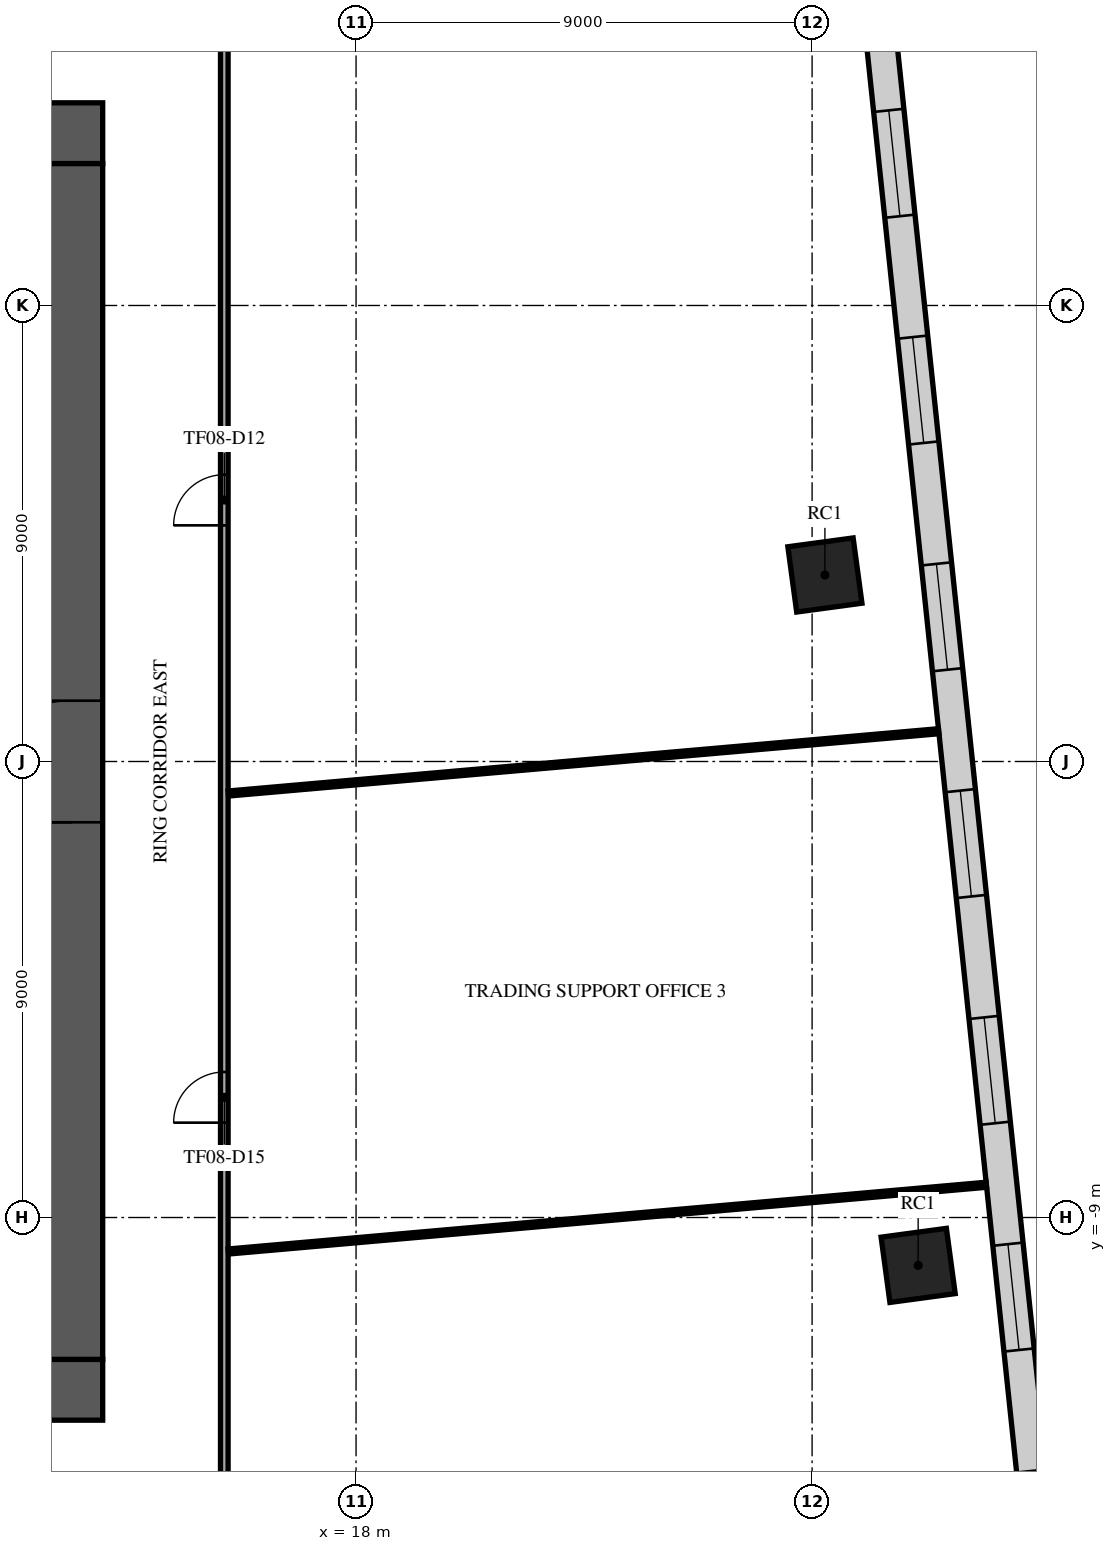
"""IFC4 building model, lengths in metres.
Left out: names, types, materials, properties, quantities, classifications, styles, units other than length and angle.
Written with IfcOpenShell. Run it as: python <this file> out.ifc"""

import sys

from ifc_helpers import new_model, si_unit, direction, frame, frame_2d, origin, origin_2d, place, context, subcontext, project, spatial, rectangle, extrude, element, fill, save


model = new_model("IFC4")
c1 = context("Model", 3, precision=1e-05, world=origin(), true_north=direction((0.0, 1.0)))
c2 = subcontext(c1, "Body", "Model", "MODEL_VIEW")
j1 = project(units=[si_unit("LENGTHUNIT", "METRE"), si_unit("PLANEANGLEUNIT", "RADIAN")], contexts=[c1])
p1 = place(None, origin())
s1 = spatial("IfcSite", under=j1, at=p1, CompositionType="ELEMENT")
p2 = place(p1, origin())
s2 = spatial("IfcBuilding", under=s1, at=p2, CompositionType="ELEMENT")
p3 = place(p2, frame((0.0, 0.0, 36.9)))
s3 = spatial("IfcBuildingStorey", under=s2, at=p3, CompositionType="ELEMENT", Elevation=36.9)
for number, where, z_axis, x_axis in (
    (1, (29.093, -9.945, 0.0), (0.0, 0.0, 1.0), (0.991, 0.134, 0.0)),
    (2, (27.253, 3.681, 0.0), (0.0, 0.0, 1.0), (0.991, 0.134, 0.0)),
):
    element("IfcColumn", number, at=place(p3, frame(where, z_axis=z_axis, x_axis=x_axis)), inside=s3, PredefinedType="COLUMN", context=c2, shape_type="SweptSolid", body=[
        extrude(rectangle(XDim=1.3, YDim=1.3, at=origin_2d()), origin(), (0.0, 0.0, 1.0), 4.8),
    ])
p4 = place(p3, frame((-13.0, 12.4, 0.0), z_axis=(0.0, 0.0, 1.0), x_axis=(1.0, 0.0, 0.0)))
e3 = element("IfcWall", 3, at=p4, inside=s3, PredefinedType="SHEAR", context=c2, shape_type="SweptSolid", body=[
    extrude(rectangle(XDim=26.0, YDim=1.2, at=frame_2d((13.0, 0.0))), origin(), (0.0, 0.0, 1.0), 4.35),
])
p5 = place(p4, frame((11.8, 0.0, 0.0)))
e4 = element("IfcOpeningElement", 4, at=p5, cuts=e3, PredefinedType="OPENING", context=c2, shape_type="SweptSolid", body=[
    extrude(rectangle(XDim=2.4, YDim=2.4, at=frame_2d((1.2, 1.2))), frame((0.0, 0.61, 0.0), z_axis=(0.0, -1.0, 0.0), x_axis=(1.0, 0.0, 0.0)), (0.0, 0.0, 1.0), 1.22),
])
p6 = place(p4, frame((22.625, 0.0, 0.0)))
e5 = element("IfcOpeningElement", 5, at=p6, cuts=e3, PredefinedType="OPENING", context=c2, shape_type="SweptSolid", body=[
    extrude(rectangle(XDim=1.2, YDim=2.1, at=frame_2d((0.6, 1.05))), frame((0.0, 0.61, 0.0), z_axis=(0.0, -1.0, 0.0), x_axis=(1.0, 0.0, 0.0)), (0.0, 0.0, 1.0), 1.22),
])
p7 = place(p4, frame((1.6, 0.0, 0.0)))
e6 = element("IfcOpeningElement", 6, at=p7, cuts=e3, PredefinedType="OPENING", context=c2, shape_type="SweptSolid", body=[
    extrude(rectangle(XDim=1.0, YDim=2.1, at=frame_2d((0.5, 1.05))), frame((0.0, 0.61, 0.0), z_axis=(0.0, -1.0, 0.0), x_axis=(1.0, 0.0, 0.0)), (0.0, 0.0, 1.0), 1.22),
])
p8 = place(p3, frame((-13.0, -12.4, 0.0), z_axis=(0.0, 0.0, 1.0), x_axis=(1.0, 0.0, 0.0)))
e7 = element("IfcWall", 7, at=p8, inside=s3, PredefinedType="SHEAR", context=c2, shape_type="SweptSolid", body=[
    extrude(rectangle(XDim=26.0, YDim=1.2, at=frame_2d((13.0, 0.0))), origin(), (0.0, 0.0, 1.0), 4.35),
])
p9 = place(p8, frame((7.9, 0.0, 0.0)))
e8 = element("IfcOpeningElement", 8, at=p9, cuts=e7, PredefinedType="OPENING", context=c2, shape_type="SweptSolid", body=[
    extrude(rectangle(XDim=2.0, YDim=2.1, at=frame_2d((1.0, 1.05))), frame((0.0, 0.61, 0.0), z_axis=(0.0, -1.0, 0.0), x_axis=(1.0, 0.0, 0.0)), (0.0, 0.0, 1.0), 1.22),
])
p10 = place(p8, frame((18.025, 0.0, 0.0)))
e9 = element("IfcOpeningElement", 9, at=p10, cuts=e7, PredefinedType="OPENING", context=c2, shape_type="SweptSolid", body=[
    extrude(rectangle(XDim=1.2, YDim=2.1, at=frame_2d((0.6, 1.05))), frame((0.0, 0.61, 0.0), z_axis=(0.0, -1.0, 0.0), x_axis=(1.0, 0.0, 0.0)), (0.0, 0.0, 1.0), 1.22),
])
p11 = place(p8, frame((2.175, 0.0, 0.0)))
e10 = element("IfcOpeningElement", 10, at=p11, cuts=e7, PredefinedType="OPENING", context=c2, shape_type="SweptSolid", body=[
    extrude(rectangle(XDim=1.2, YDim=2.1, at=frame_2d((0.6, 1.05))), frame((0.0, 0.61, 0.0), z_axis=(0.0, -1.0, 0.0), x_axis=(1.0, 0.0, 0.0)), (0.0, 0.0, 1.0), 1.22),
])
p12 = place(p8, frame((22.625, 0.0, 0.0)))
e11 = element("IfcOpeningElement", 11, at=p12, cuts=e7, PredefinedType="OPENING", context=c2, shape_type="SweptSolid", body=[
    extrude(rectangle(XDim=1.2, YDim=2.1, at=frame_2d((0.6, 1.05))), frame((0.0, 0.61, 0.0), z_axis=(0.0, -1.0, 0.0), x_axis=(1.0, 0.0, 0.0)), (0.0, 0.0, 1.0), 1.22),
])
p13 = place(p3, frame((12.4, -11.8, 0.0), z_axis=(0.0, 0.0, 1.0), x_axis=(0.0, 1.0, 0.0)))
e12 = element("IfcWall", 12, at=p13, inside=s3, PredefinedType="SHEAR", context=c2, shape_type="SweptSolid", body=[
    extrude(rectangle(XDim=23.6, YDim=1.2, at=frame_2d((11.8, 0.0))), origin(), (0.0, 0.0, 1.0), 4.35),
])
p14 = place(p13, frame((10.6, 0.0, 0.0)))
e13 = element("IfcOpeningElement", 13, at=p14, cuts=e12, PredefinedType="OPENING", context=c2, shape_type="SweptSolid", body=[
    extrude(rectangle(XDim=2.4, YDim=2.4, at=frame_2d((1.2, 1.2))), frame((0.0, 0.61, 0.0), z_axis=(0.0, -1.0, 0.0), x_axis=(1.0, 0.0, 0.0)), (0.0, 0.0, 1.0), 1.22),
])
p15 = place(p3, frame((32.137, -21.635, 0.0), z_axis=(0.0, 0.0, 1.0), x_axis=(-0.104527776833, 0.994521967515, 0.0)))
e14 = element("IfcWall", 14, at=p15, inside=s3, PredefinedType="STANDARD", context=c2, shape_type="SweptSolid", body=[
    extrude(rectangle(XDim=49.376, YDim=0.6, at=frame_2d((24.688, 0.0))), origin(), (0.0, 0.0, 1.0), 4.35),
])
p16 = place(p15, frame((1.138, 0.0, 0.9)))
e15 = element("IfcOpeningElement", 15, at=p16, cuts=e14, PredefinedType="OPENING", context=c2, shape_type="SweptSolid", body=[
    extrude(rectangle(XDim=2.1, YDim=2.7, at=frame_2d((1.05, 1.35))), frame((0.0, 0.31, 0.0), z_axis=(0.0, -1.0, 0.0), x_axis=(1.0, 0.0, 0.0)), (0.0, 0.0, 1.0), 0.62),
])
p17 = place(p15, frame((5.576, 0.0, 0.9)))
e16 = element("IfcOpeningElement", 16, at=p17, cuts=e14, PredefinedType="OPENING", context=c2, shape_type="SweptSolid", body=[
    extrude(rectangle(XDim=2.1, YDim=2.7, at=frame_2d((1.05, 1.35))), frame((0.0, 0.31, 0.0), z_axis=(0.0, -1.0, 0.0), x_axis=(1.0, 0.0, 0.0)), (0.0, 0.0, 1.0), 0.62),
])
p18 = place(p15, frame((10.076, 0.0, 0.9)))
e17 = element("IfcOpeningElement", 17, at=p18, cuts=e14, PredefinedType="OPENING", context=c2, shape_type="SweptSolid", body=[
    extrude(rectangle(XDim=2.1, YDim=2.7, at=frame_2d((1.05, 1.35))), frame((0.0, 0.31, 0.0), z_axis=(0.0, -1.0, 0.0), x_axis=(1.0, 0.0, 0.0)), (0.0, 0.0, 1.0), 0.62),
])
p19 = place(p15, frame((14.576, 0.0, 0.9)))
e18 = element("IfcOpeningElement", 18, at=p19, cuts=e14, PredefinedType="OPENING", context=c2, shape_type="SweptSolid", body=[
    extrude(rectangle(XDim=2.1, YDim=2.7, at=frame_2d((1.05, 1.35))), frame((0.0, 0.31, 0.0), z_axis=(0.0, -1.0, 0.0), x_axis=(1.0, 0.0, 0.0)), (0.0, 0.0, 1.0), 0.62),
])
p20 = place(p15, frame((19.076, 0.0, 0.9)))
e19 = element("IfcOpeningElement", 19, at=p20, cuts=e14, PredefinedType="OPENING", context=c2, shape_type="SweptSolid", body=[
    extrude(rectangle(XDim=2.1, YDim=2.7, at=frame_2d((1.05, 1.35))), frame((0.0, 0.31, 0.0), z_axis=(0.0, -1.0, 0.0), x_axis=(1.0, 0.0, 0.0)), (0.0, 0.0, 1.0), 0.62),
])
p21 = place(p15, frame((23.576, 0.0, 0.9)))
e20 = element("IfcOpeningElement", 20, at=p21, cuts=e14, PredefinedType="OPENING", context=c2, shape_type="SweptSolid", body=[
    extrude(rectangle(XDim=2.1, YDim=2.7, at=frame_2d((1.05, 1.35))), frame((0.0, 0.31, 0.0), z_axis=(0.0, -1.0, 0.0), x_axis=(1.0, 0.0, 0.0)), (0.0, 0.0, 1.0), 0.62),
])
p22 = place(p15, frame((28.076, 0.0, 0.9)))
e21 = element("IfcOpeningElement", 21, at=p22, cuts=e14, PredefinedType="OPENING", context=c2, shape_type="SweptSolid", body=[
    extrude(rectangle(XDim=2.1, YDim=2.7, at=frame_2d((1.05, 1.35))), frame((0.0, 0.31, 0.0), z_axis=(0.0, -1.0, 0.0), x_axis=(1.0, 0.0, 0.0)), (0.0, 0.0, 1.0), 0.62),
])
p23 = place(p15, frame((32.576, 0.0, 0.9)))
e22 = element("IfcOpeningElement", 22, at=p23, cuts=e14, PredefinedType="OPENING", context=c2, shape_type="SweptSolid", body=[
    extrude(rectangle(XDim=2.1, YDim=2.7, at=frame_2d((1.05, 1.35))), frame((0.0, 0.31, 0.0), z_axis=(0.0, -1.0, 0.0), x_axis=(1.0, 0.0, 0.0)), (0.0, 0.0, 1.0), 0.62),
])
p24 = place(p15, frame((37.076, 0.0, 0.9)))
e23 = element("IfcOpeningElement", 23, at=p24, cuts=e14, PredefinedType="OPENING", context=c2, shape_type="SweptSolid", body=[
    extrude(rectangle(XDim=2.1, YDim=2.7, at=frame_2d((1.05, 1.35))), frame((0.0, 0.31, 0.0), z_axis=(0.0, -1.0, 0.0), x_axis=(1.0, 0.0, 0.0)), (0.0, 0.0, 1.0), 0.62),
])
p25 = place(p15, frame((41.576, 0.0, 0.9)))
e24 = element("IfcOpeningElement", 24, at=p25, cuts=e14, PredefinedType="OPENING", context=c2, shape_type="SweptSolid", body=[
    extrude(rectangle(XDim=2.1, YDim=2.7, at=frame_2d((1.05, 1.35))), frame((0.0, 0.31, 0.0), z_axis=(0.0, -1.0, 0.0), x_axis=(1.0, 0.0, 0.0)), (0.0, 0.0, 1.0), 0.62),
])
p26 = place(p15, frame((46.076, 0.0, 0.9)))
e25 = element("IfcOpeningElement", 25, at=p26, cuts=e14, PredefinedType="OPENING", context=c2, shape_type="SweptSolid", body=[
    extrude(rectangle(XDim=2.1, YDim=2.7, at=frame_2d((1.05, 1.35))), frame((0.0, 0.31, 0.0), z_axis=(0.0, -1.0, 0.0), x_axis=(1.0, 0.0, 0.0)), (0.0, 0.0, 1.0), 0.62),
])
p27 = place(p3, frame((15.4, -15.325, 0.0), z_axis=(0.0, 0.0, 1.0), x_axis=(0.0, 1.0, 0.0)))
e26 = element("IfcWall", 26, at=p27, inside=s3, PredefinedType="PARTITIONING", context=c2, shape_type="SweptSolid", body=[
    extrude(rectangle(XDim=30.65, YDim=0.15, at=frame_2d((15.325, 0.0))), origin(), (0.0, 0.0, 1.0), 3.85),
])
p28 = place(p27, frame((19.986, 0.0, 0.0)))
e27 = element("IfcOpeningElement", 27, at=p28, cuts=e26, PredefinedType="OPENING", context=c2, shape_type="SweptSolid", body=[
    extrude(rectangle(XDim=1.0, YDim=2.1, at=frame_2d((0.5, 1.05))), frame((0.0, 0.085, 0.0), z_axis=(0.0, -1.0, 0.0), x_axis=(1.0, 0.0, 0.0)), (0.0, 0.0, 1.0), 0.17),
])
p29 = place(p27, frame((8.197, 0.0, 0.0)))
e28 = element("IfcOpeningElement", 28, at=p29, cuts=e26, PredefinedType="OPENING", context=c2, shape_type="SweptSolid", body=[
    extrude(rectangle(XDim=1.0, YDim=2.1, at=frame_2d((0.5, 1.05))), frame((0.0, 0.085, 0.0), z_axis=(0.0, -1.0, 0.0), x_axis=(1.0, 0.0, 0.0)), (0.0, 0.0, 1.0), 0.17),
])
p30 = place(p3, frame((15.479, -9.671, 0.0), z_axis=(0.0, 0.0, 1.0), x_axis=(0.996145743112, 0.08771350227, 0.0)))
e29 = element("IfcWall", 29, at=p30, inside=s3, PredefinedType="PARTITIONING", context=c2, shape_type="SweptSolid", body=[
    extrude(rectangle(XDim=15.016, YDim=0.1, at=frame_2d((7.508, 0.0))), origin(), (0.0, 0.0, 1.0), 3.55),
])
p31 = place(p3, frame((15.479, -0.632, 0.0), z_axis=(0.0, 0.0, 1.0), x_axis=(0.99617559828, 0.087373779768, 0.0)))
e30 = element("IfcWall", 30, at=p31, inside=s3, PredefinedType="PARTITIONING", context=c2, shape_type="SweptSolid", body=[
    extrude(rectangle(XDim=14.072, YDim=0.1, at=frame_2d((7.036, 0.0))), origin(), (0.0, 0.0, 1.0), 3.55),
])
p32 = place(p14, origin())
e31 = element("IfcDoor", 31, at=p32, inside=s3, OperationType="SINGLE_SWING_LEFT", PredefinedType="DOOR", context=c2, shape_type="SweptSolid", body=[
    extrude(rectangle(XDim=2.4, YDim=2.4, at=frame_2d((1.2, 1.2))), frame((0.0, 0.025, 0.0), z_axis=(0.0, -1.0, 0.0), x_axis=(1.0, 0.0, 0.0)), (0.0, 0.0, 1.0), 0.05),
])
fill(e13, e31)
p33 = place(p17, origin())
e32 = element("IfcWindow", 32, at=p33, inside=s3, PartitioningType="SINGLE_PANEL", PredefinedType="WINDOW", context=c2, shape_type="SweptSolid", body=[
    extrude(rectangle(XDim=2.1, YDim=2.7, at=frame_2d((1.05, 1.35))), frame((0.0, 0.03, 0.0), z_axis=(0.0, -1.0, 0.0), x_axis=(1.0, 0.0, 0.0)), (0.0, 0.0, 1.0), 0.06),
])
fill(e16, e32)
p34 = place(p18, origin())
e33 = element("IfcWindow", 33, at=p34, inside=s3, PartitioningType="SINGLE_PANEL", PredefinedType="WINDOW", context=c2, shape_type="SweptSolid", body=[
    extrude(rectangle(XDim=2.1, YDim=2.7, at=frame_2d((1.05, 1.35))), frame((0.0, 0.03, 0.0), z_axis=(0.0, -1.0, 0.0), x_axis=(1.0, 0.0, 0.0)), (0.0, 0.0, 1.0), 0.06),
])
fill(e17, e33)
p35 = place(p19, origin())
e34 = element("IfcWindow", 34, at=p35, inside=s3, PartitioningType="SINGLE_PANEL", PredefinedType="WINDOW", context=c2, shape_type="SweptSolid", body=[
    extrude(rectangle(XDim=2.1, YDim=2.7, at=frame_2d((1.05, 1.35))), frame((0.0, 0.03, 0.0), z_axis=(0.0, -1.0, 0.0), x_axis=(1.0, 0.0, 0.0)), (0.0, 0.0, 1.0), 0.06),
])
fill(e18, e34)
p36 = place(p20, origin())
e35 = element("IfcWindow", 35, at=p36, inside=s3, PartitioningType="SINGLE_PANEL", PredefinedType="WINDOW", context=c2, shape_type="SweptSolid", body=[
    extrude(rectangle(XDim=2.1, YDim=2.7, at=frame_2d((1.05, 1.35))), frame((0.0, 0.03, 0.0), z_axis=(0.0, -1.0, 0.0), x_axis=(1.0, 0.0, 0.0)), (0.0, 0.0, 1.0), 0.06),
])
fill(e19, e35)
p37 = place(p21, origin())
e36 = element("IfcWindow", 36, at=p37, inside=s3, PartitioningType="SINGLE_PANEL", PredefinedType="WINDOW", context=c2, shape_type="SweptSolid", body=[
    extrude(rectangle(XDim=2.1, YDim=2.7, at=frame_2d((1.05, 1.35))), frame((0.0, 0.03, 0.0), z_axis=(0.0, -1.0, 0.0), x_axis=(1.0, 0.0, 0.0)), (0.0, 0.0, 1.0), 0.06),
])
fill(e20, e36)
p38 = place(p22, origin())
e37 = element("IfcWindow", 37, at=p38, inside=s3, PartitioningType="SINGLE_PANEL", PredefinedType="WINDOW", context=c2, shape_type="SweptSolid", body=[
    extrude(rectangle(XDim=2.1, YDim=2.7, at=frame_2d((1.05, 1.35))), frame((0.0, 0.03, 0.0), z_axis=(0.0, -1.0, 0.0), x_axis=(1.0, 0.0, 0.0)), (0.0, 0.0, 1.0), 0.06),
])
fill(e21, e37)
p39 = place(p23, origin())
e38 = element("IfcWindow", 38, at=p39, inside=s3, PartitioningType="SINGLE_PANEL", PredefinedType="WINDOW", context=c2, shape_type="SweptSolid", body=[
    extrude(rectangle(XDim=2.1, YDim=2.7, at=frame_2d((1.05, 1.35))), frame((0.0, 0.03, 0.0), z_axis=(0.0, -1.0, 0.0), x_axis=(1.0, 0.0, 0.0)), (0.0, 0.0, 1.0), 0.06),
])
fill(e22, e38)
p40 = place(p28, frame((1.0, 0.0, 0.0), z_axis=(0.0, 0.0, 1.0), x_axis=(-1.0, 0.0, 0.0)))
e39 = element("IfcDoor", 39, at=p40, inside=s3, OperationType="SINGLE_SWING_RIGHT", PredefinedType="DOOR", context=c2, shape_type="SweptSolid", body=[
    extrude(rectangle(XDim=1.0, YDim=2.1, at=frame_2d((0.5, 1.05))), frame((0.0, 0.025, 0.0), z_axis=(0.0, -1.0, 0.0), x_axis=(1.0, 0.0, 0.0)), (0.0, 0.0, 1.0), 0.05),
])
fill(e27, e39)
p41 = place(p29, frame((1.0, 0.0, 0.0), z_axis=(0.0, 0.0, 1.0), x_axis=(-1.0, 0.0, 0.0)))
e40 = element("IfcDoor", 40, at=p41, inside=s3, OperationType="SINGLE_SWING_LEFT", PredefinedType="DOOR", context=c2, shape_type="SweptSolid", body=[
    extrude(rectangle(XDim=1.0, YDim=2.1, at=frame_2d((0.5, 1.05))), frame((0.0, 0.025, 0.0), z_axis=(0.0, -1.0, 0.0), x_axis=(1.0, 0.0, 0.0)), (0.0, 0.0, 1.0), 0.05),
])
fill(e28, e40)
save(model, sys.argv[1])
